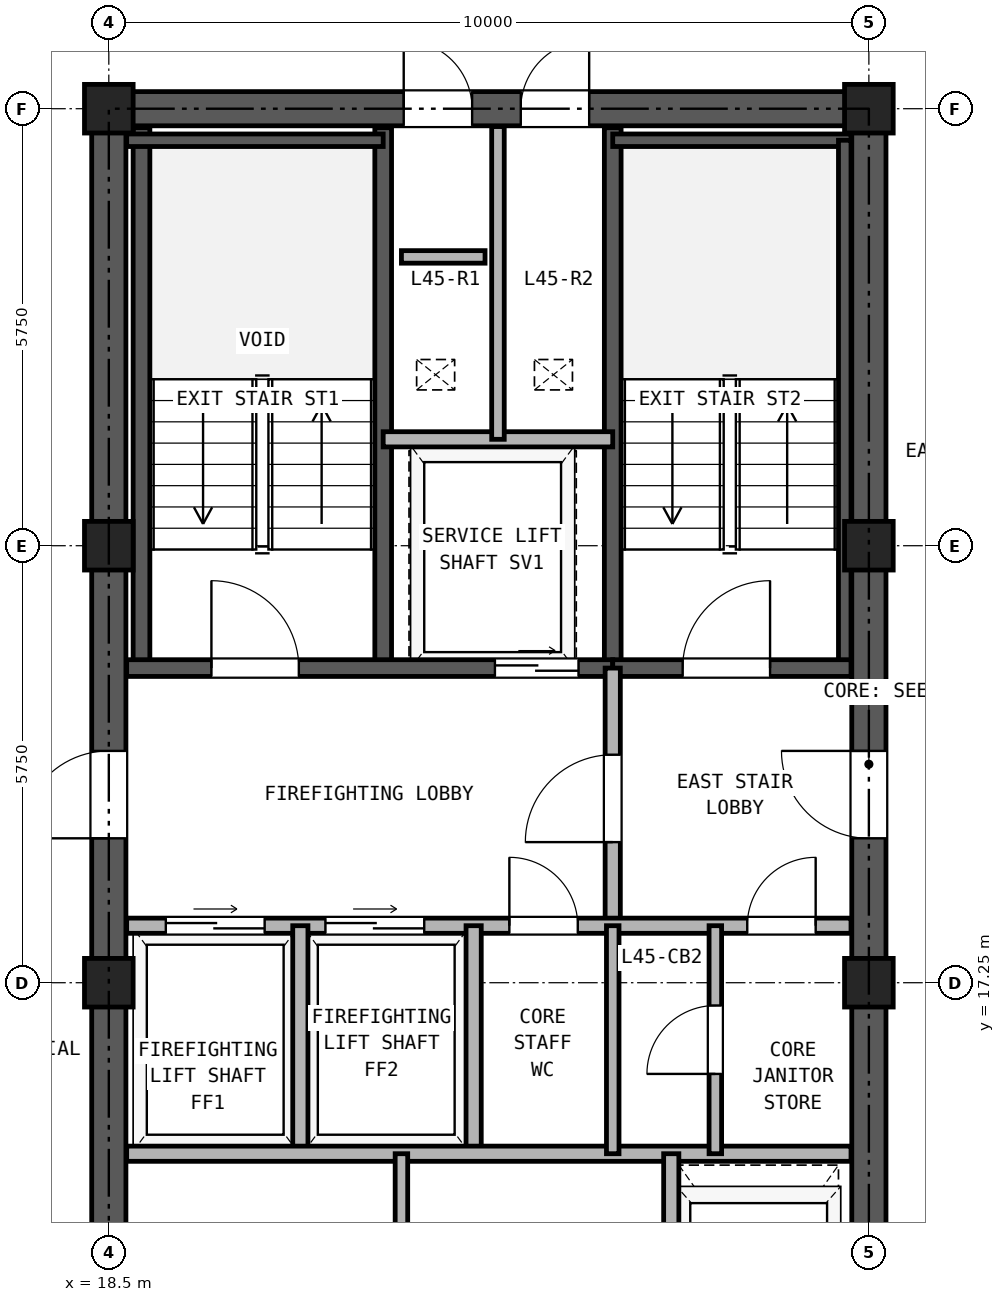
"""IFC4 building model, lengths in metres.
Left out: names, types, materials, properties, quantities, classifications, styles, units other than length and angle.
Written with IfcOpenShell. Run it as: python <this file> out.ifc"""

import sys

from ifc_helpers import new_model, si_unit, direction, frame, frame_2d, origin, origin_2d, place, context, subcontext, project, spatial, rectangle, hollow_rectangle, extrude, source, transform, mapped, element, fill, save


model = new_model("IFC4")
c1 = context("Model", 3, precision=1e-05, world=origin(), true_north=direction((0.0, 1.0)))
c2 = subcontext(c1, "Body", "Model", "MODEL_VIEW")
j1 = project(units=[si_unit("LENGTHUNIT", "METRE"), si_unit("PLANEANGLEUNIT", "RADIAN")], contexts=[c1])
p1 = place(None, origin())
s1 = spatial("IfcSite", under=j1, at=p1, CompositionType="ELEMENT")
p2 = place(p1, origin())
s2 = spatial("IfcBuilding", under=s1, at=p2, CompositionType="ELEMENT")
p3 = place(p2, frame((0.0, 0.0, 162.5)))
s3 = spatial("IfcBuildingStorey", under=s2, at=p3, CompositionType="ELEMENT", Elevation=162.5)
m1 = source(origin(), c2, "Body", "SweptSolid", [
    extrude(hollow_rectangle(XDim=0.64, YDim=0.64, WallThickness=0.035, at=origin_2d()), origin(), (0.0, 0.0, 1.0), 2.95),
])
for number, where, z_axis, x_axis in (
    (1, (18.5, 17.25, 0.0), (0.0, 0.0, 1.0), (1.0, 0.0, 0.0)),
    (2, (18.5, 23.0, 0.0), (0.0, 0.0, 1.0), (1.0, 0.0, 0.0)),
    (3, (18.5, 28.75, 0.0), (0.0, 0.0, 1.0), (1.0, 0.0, 0.0)),
    (4, (28.5, 17.25, 0.0), (0.0, 0.0, 1.0), (1.0, 0.0, 0.0)),
    (5, (28.5, 23.0, 0.0), (0.0, 0.0, 1.0), (1.0, 0.0, 0.0)),
    (6, (28.5, 28.75, 0.0), (0.0, 0.0, 1.0), (1.0, 0.0, 0.0)),
):
    element("IfcColumn", number, at=place(p3, frame(where, z_axis=z_axis, x_axis=x_axis)), inside=s3, PredefinedType="COLUMN", context=c2, shape_type="MappedRepresentation", body=[
        mapped(m1, transform((0.0, 0.0, 0.0), x_axis=(1.0, 0.0, 0.0), y_axis=(0.0, 1.0, 0.0), z_axis=(0.0, 0.0, 1.0), scale=1.0)),
    ])
p4 = place(p3, frame((18.275, 28.75, 0.0), z_axis=(0.0, 0.0, 1.0), x_axis=(1.0, 0.0, 0.0)))
e7 = element("IfcWall", 7, at=p4, inside=s3, PredefinedType="SHEAR", context=c2, shape_type="SweptSolid", body=[
    extrude(rectangle(XDim=10.45, YDim=0.45, at=frame_2d((5.225, 0.0))), origin(), (0.0, 0.0, 1.0), 2.95),
])
p5 = place(p4, frame((4.105, 0.0, 0.0)))
e8 = element("IfcOpeningElement", 8, at=p5, cuts=e7, PredefinedType="OPENING", context=c2, shape_type="SweptSolid", body=[
    extrude(rectangle(XDim=0.9, YDim=2.05, at=frame_2d((0.45, 1.025))), frame((0.0, 0.235, 0.0), z_axis=(0.0, -1.0, 0.0), x_axis=(1.0, 0.0, 0.0)), (0.0, 0.0, 1.0), 0.47),
])
p6 = place(p4, frame((5.645, 0.0, 0.0)))
e9 = element("IfcOpeningElement", 9, at=p6, cuts=e7, PredefinedType="OPENING", context=c2, shape_type="SweptSolid", body=[
    extrude(rectangle(XDim=0.9, YDim=2.05, at=frame_2d((0.45, 1.025))), frame((0.0, 0.235, 0.0), z_axis=(0.0, -1.0, 0.0), x_axis=(1.0, 0.0, 0.0)), (0.0, 0.0, 1.0), 0.47),
])
p7 = place(p3, frame((18.5, 11.725, 0.0), z_axis=(0.0, 0.0, 1.0), x_axis=(0.0, 1.0, 0.0)))
e10 = element("IfcWall", 10, at=p7, inside=s3, PredefinedType="SHEAR", context=c2, shape_type="SweptSolid", body=[
    extrude(rectangle(XDim=16.8, YDim=0.45, at=frame_2d((8.4, 0.0))), origin(), (0.0, 0.0, 1.0), 2.95),
])
p8 = place(p7, frame((7.425, 0.0, 0.0)))
e11 = element("IfcOpeningElement", 11, at=p8, cuts=e10, PredefinedType="OPENING", context=c2, shape_type="SweptSolid", body=[
    extrude(rectangle(XDim=1.15, YDim=2.2, at=frame_2d((0.575, 1.1))), frame((0.0, 0.235, 0.0), z_axis=(0.0, -1.0, 0.0), x_axis=(1.0, 0.0, 0.0)), (0.0, 0.0, 1.0), 0.47),
])
p9 = place(p3, frame((28.5, 11.725, 0.0), z_axis=(0.0, 0.0, 1.0), x_axis=(0.0, 1.0, 0.0)))
e12 = element("IfcWall", 12, at=p9, inside=s3, PredefinedType="SHEAR", context=c2, shape_type="SweptSolid", body=[
    extrude(rectangle(XDim=16.8, YDim=0.45, at=frame_2d((8.4, 0.0))), origin(), (0.0, 0.0, 1.0), 2.95),
])
p10 = place(p9, frame((7.425, 0.0, 0.0)))
e13 = element("IfcOpeningElement", 13, at=p10, cuts=e12, PredefinedType="OPENING", context=c2, shape_type="SweptSolid", body=[
    extrude(rectangle(XDim=1.15, YDim=2.2, at=frame_2d((0.575, 1.1))), frame((0.0, 0.235, 0.0), z_axis=(0.0, -1.0, 0.0), x_axis=(1.0, 0.0, 0.0)), (0.0, 0.0, 1.0), 0.47),
])
for number, where, z_axis, x_axis in (
    (14, (18.93, 21.39, 0.0), (0.0, 0.0, 1.0), (0.0, 1.0, 0.0)),
    (15, (22.11, 21.39, 0.0), (0.0, 0.0, 1.0), (0.0, 1.0, 0.0)),
    (16, (25.13, 21.39, 0.0), (0.0, 0.0, 1.0), (0.0, 1.0, 0.0)),
):
    element("IfcWall", number, at=place(p3, frame(where, z_axis=z_axis, x_axis=x_axis)), inside=s3, PredefinedType="SOLIDWALL", context=c2, shape_type="SweptSolid", body=[
        extrude(rectangle(XDim=7.11, YDim=0.22, at=frame_2d((3.555, 0.0))), origin(), (0.0, 0.0, 1.0), 2.95),
    ])
p11 = place(p3, frame((18.735, 28.335, 0.0), z_axis=(0.0, 0.0, 1.0), x_axis=(1.0, 0.0, 0.0)))
e17 = element("IfcWall", 17, at=p11, inside=s3, PredefinedType="PARTITIONING", context=c2, shape_type="SweptSolid", body=[
    extrude(rectangle(XDim=3.375, YDim=0.165, at=frame_2d((1.688, 0.0))), origin(), (0.0, 0.0, 1.0), 2.95),
])
p12 = place(p3, frame((25.13, 28.335, 0.0), z_axis=(0.0, 0.0, 1.0), x_axis=(1.0, 0.0, 0.0)))
e18 = element("IfcWall", 18, at=p12, inside=s3, PredefinedType="PARTITIONING", context=c2, shape_type="SweptSolid", body=[
    extrude(rectangle(XDim=3.135, YDim=0.165, at=frame_2d((1.567, 0.0))), origin(), (0.0, 0.0, 1.0), 2.95),
])
p13 = place(p3, frame((28.183, 21.39, 0.0), z_axis=(0.0, 0.0, 1.0), x_axis=(0.0, 1.0, 0.0)))
e19 = element("IfcWall", 19, at=p13, inside=s3, PredefinedType="PARTITIONING", context=c2, shape_type="SweptSolid", body=[
    extrude(rectangle(XDim=6.945, YDim=0.165, at=frame_2d((3.473, 0.0))), origin(), (0.0, 0.0, 1.0), 2.95),
])
p14 = place(p3, frame((18.735, 21.39, 0.0), z_axis=(0.0, 0.0, 1.0), x_axis=(1.0, 0.0, 0.0)))
e20 = element("IfcWall", 20, at=p14, inside=s3, PredefinedType="SOLIDWALL", context=c2, shape_type="SweptSolid", body=[
    extrude(rectangle(XDim=6.395, YDim=0.22, at=frame_2d((3.197, 0.0))), origin(), (0.0, 0.0, 1.0), 2.95),
])
p15 = place(p14, frame((1.115, 0.0, 0.0)))
e21 = element("IfcOpeningElement", 21, at=p15, cuts=e20, PredefinedType="OPENING", context=c2, shape_type="SweptSolid", body=[
    extrude(rectangle(XDim=1.15, YDim=2.2, at=frame_2d((0.575, 1.1))), frame((0.0, 0.12, 0.0), z_axis=(0.0, -1.0, 0.0), x_axis=(1.0, 0.0, 0.0)), (0.0, 0.0, 1.0), 0.24),
])
p16 = place(p14, frame((4.845, 0.0, 0.0)))
e22 = element("IfcOpeningElement", 22, at=p16, cuts=e20, PredefinedType="OPENING", context=c2, shape_type="SweptSolid", body=[
    extrude(rectangle(XDim=1.1, YDim=2.25, at=frame_2d((0.55, 1.125))), frame((0.0, 0.12, 0.0), z_axis=(0.0, -1.0, 0.0), x_axis=(1.0, 0.0, 0.0)), (0.0, 0.0, 1.0), 0.24),
])
p17 = place(p3, frame((25.13, 21.39, 0.0), z_axis=(0.0, 0.0, 1.0), x_axis=(1.0, 0.0, 0.0)))
e23 = element("IfcWall", 23, at=p17, inside=s3, PredefinedType="SOLIDWALL", context=c2, shape_type="SweptSolid", body=[
    extrude(rectangle(XDim=3.135, YDim=0.22, at=frame_2d((1.567, 0.0))), origin(), (0.0, 0.0, 1.0), 2.95),
])
p18 = place(p17, frame((0.92, 0.0, 0.0)))
e24 = element("IfcOpeningElement", 24, at=p18, cuts=e23, PredefinedType="OPENING", context=c2, shape_type="SweptSolid", body=[
    extrude(rectangle(XDim=1.15, YDim=2.2, at=frame_2d((0.575, 1.1))), frame((0.0, 0.12, 0.0), z_axis=(0.0, -1.0, 0.0), x_axis=(1.0, 0.0, 0.0)), (0.0, 0.0, 1.0), 0.24),
])
p19 = place(p3, frame((22.11, 24.4, 0.0), z_axis=(0.0, 0.0, 1.0), x_axis=(1.0, 0.0, 0.0)))
e25 = element("IfcWall", 25, at=p19, inside=s3, PredefinedType="PARTITIONING", context=c2, shape_type="SweptSolid", body=[
    extrude(rectangle(XDim=3.02, YDim=0.2, at=frame_2d((1.51, 0.0))), origin(), (0.0, 0.0, 1.0), 2.95),
])
p20 = place(p3, frame((23.62, 24.4, 0.0), z_axis=(0.0, 0.0, 1.0), x_axis=(0.0, 1.0, 0.0)))
e26 = element("IfcWall", 26, at=p20, inside=s3, PredefinedType="PARTITIONING", context=c2, shape_type="SweptSolid", body=[
    extrude(rectangle(XDim=4.115, YDim=0.165, at=frame_2d((2.058, 0.0))), origin(), (0.0, 0.0, 1.0), 2.95),
])
p21 = place(p3, frame((25.13, 18.0, 0.0), z_axis=(0.0, 0.0, 1.0), x_axis=(0.0, 1.0, 0.0)))
e27 = element("IfcWall", 27, at=p21, inside=s3, PredefinedType="PARTITIONING", context=c2, shape_type="SweptSolid", body=[
    extrude(rectangle(XDim=3.39, YDim=0.2, at=frame_2d((1.695, 0.0))), origin(), (0.0, 0.0, 1.0), 2.95),
])
p22 = place(p21, frame((1.1, 0.0, 0.0)))
e28 = element("IfcOpeningElement", 28, at=p22, cuts=e27, PredefinedType="OPENING", context=c2, shape_type="SweptSolid", body=[
    extrude(rectangle(XDim=1.15, YDim=2.2, at=frame_2d((0.575, 1.1))), frame((0.0, 0.11, 0.0), z_axis=(0.0, -1.0, 0.0), x_axis=(1.0, 0.0, 0.0)), (0.0, 0.0, 1.0), 0.22),
])
p23 = place(p3, frame((18.735, 18.0, 0.0), z_axis=(0.0, 0.0, 1.0), x_axis=(1.0, 0.0, 0.0)))
e29 = element("IfcWall", 29, at=p23, inside=s3, PredefinedType="PARTITIONING", context=c2, shape_type="SweptSolid", body=[
    extrude(rectangle(XDim=9.53, YDim=0.2, at=frame_2d((4.765, 0.0))), origin(), (0.0, 0.0, 1.0), 2.95),
])
p24 = place(p23, frame((0.515, 0.0, 0.0)))
e30 = element("IfcOpeningElement", 30, at=p24, cuts=e29, PredefinedType="OPENING", context=c2, shape_type="SweptSolid", body=[
    extrude(rectangle(XDim=1.3, YDim=2.3, at=frame_2d((0.65, 1.15))), frame((0.0, 0.11, 0.0), z_axis=(0.0, -1.0, 0.0), x_axis=(1.0, 0.0, 0.0)), (0.0, 0.0, 1.0), 0.22),
])
p25 = place(p23, frame((2.615, 0.0, 0.0)))
e31 = element("IfcOpeningElement", 31, at=p25, cuts=e29, PredefinedType="OPENING", context=c2, shape_type="SweptSolid", body=[
    extrude(rectangle(XDim=1.3, YDim=2.3, at=frame_2d((0.65, 1.15))), frame((0.0, 0.11, 0.0), z_axis=(0.0, -1.0, 0.0), x_axis=(1.0, 0.0, 0.0)), (0.0, 0.0, 1.0), 0.22),
])
p26 = place(p23, frame((5.035, 0.0, 0.0)))
e32 = element("IfcOpeningElement", 32, at=p26, cuts=e29, PredefinedType="OPENING", context=c2, shape_type="SweptSolid", body=[
    extrude(rectangle(XDim=0.9, YDim=2.05, at=frame_2d((0.45, 1.025))), frame((0.0, 0.11, 0.0), z_axis=(0.0, -1.0, 0.0), x_axis=(1.0, 0.0, 0.0)), (0.0, 0.0, 1.0), 0.22),
])
p27 = place(p23, frame((8.165, 0.0, 0.0)))
e33 = element("IfcOpeningElement", 33, at=p27, cuts=e29, PredefinedType="OPENING", context=c2, shape_type="SweptSolid", body=[
    extrude(rectangle(XDim=0.9, YDim=2.05, at=frame_2d((0.45, 1.025))), frame((0.0, 0.11, 0.0), z_axis=(0.0, -1.0, 0.0), x_axis=(1.0, 0.0, 0.0)), (0.0, 0.0, 1.0), 0.22),
])
for number, where, z_axis, x_axis in (
    (34, (21.02, 15.0, 0.0), (0.0, 0.0, 1.0), (0.0, 1.0, 0.0)),
    (35, (23.3, 15.0, 0.0), (0.0, 0.0, 1.0), (0.0, 1.0, 0.0)),
):
    element("IfcWall", number, at=place(p3, frame(where, z_axis=z_axis, x_axis=x_axis)), inside=s3, PredefinedType="PARTITIONING", context=c2, shape_type="SweptSolid", body=[
        extrude(rectangle(XDim=3.0, YDim=0.2, at=frame_2d((1.5, 0.0))), origin(), (0.0, 0.0, 1.0), 2.95),
    ])
p28 = place(p3, frame((18.735, 15.0, 0.0), z_axis=(0.0, 0.0, 1.0), x_axis=(1.0, 0.0, 0.0)))
e36 = element("IfcWall", 36, at=p28, inside=s3, PredefinedType="PARTITIONING", context=c2, shape_type="SweptSolid", body=[
    extrude(rectangle(XDim=9.53, YDim=0.2, at=frame_2d((4.765, 0.0))), origin(), (0.0, 0.0, 1.0), 2.95),
])
p29 = place(p3, frame((25.13, 15.0, 0.0), z_axis=(0.0, 0.0, 1.0), x_axis=(0.0, 1.0, 0.0)))
e37 = element("IfcWall", 37, at=p29, inside=s3, PredefinedType="PARTITIONING", context=c2, shape_type="SweptSolid", body=[
    extrude(rectangle(XDim=3.0, YDim=0.165, at=frame_2d((1.5, 0.0))), origin(), (0.0, 0.0, 1.0), 2.95),
])
p30 = place(p3, frame((26.48, 15.0, 0.0), z_axis=(0.0, 0.0, 1.0), x_axis=(0.0, 1.0, 0.0)))
e38 = element("IfcWall", 38, at=p30, inside=s3, PredefinedType="PARTITIONING", context=c2, shape_type="SweptSolid", body=[
    extrude(rectangle(XDim=3.0, YDim=0.165, at=frame_2d((1.5, 0.0))), origin(), (0.0, 0.0, 1.0), 2.95),
])
p31 = place(p30, frame((1.05, 0.0, 0.0)))
e39 = element("IfcOpeningElement", 39, at=p31, cuts=e38, PredefinedType="OPENING", context=c2, shape_type="SweptSolid", body=[
    extrude(rectangle(XDim=0.9, YDim=2.05, at=frame_2d((0.45, 1.025))), frame((0.0, 0.093, 0.0), z_axis=(0.0, -1.0, 0.0), x_axis=(1.0, 0.0, 0.0)), (0.0, 0.0, 1.0), 0.185),
])
p32 = place(p3, frame((22.35, 11.735, 0.0), z_axis=(0.0, 0.0, 1.0), x_axis=(0.0, 1.0, 0.0)))
e40 = element("IfcWall", 40, at=p32, inside=s3, PredefinedType="PARTITIONING", context=c2, shape_type="SweptSolid", body=[
    extrude(rectangle(XDim=3.265, YDim=0.165, at=frame_2d((1.632, 0.0))), origin(), (0.0, 0.0, 1.0), 2.95),
])
p33 = place(p3, frame((25.9, 11.735, 0.0), z_axis=(0.0, 0.0, 1.0), x_axis=(0.0, 1.0, 0.0)))
e41 = element("IfcWall", 41, at=p33, inside=s3, PredefinedType="PARTITIONING", context=c2, shape_type="SweptSolid", body=[
    extrude(rectangle(XDim=3.265, YDim=0.2, at=frame_2d((1.632, 0.0))), origin(), (0.0, 0.0, 1.0), 2.95),
])
p34 = place(p3, frame((22.35, 26.8, 0.0), z_axis=(0.0, 0.0, 1.0), x_axis=(1.0, 0.0, 0.0)))
e42 = element("IfcWall", 42, at=p34, inside=s3, PredefinedType="PARTITIONING", context=c2, shape_type="SweptSolid", body=[
    extrude(rectangle(XDim=1.1, YDim=0.165, at=frame_2d((0.55, 0.0))), origin(), (0.0, 0.0, 1.0), 2.95),
])
p35 = place(p15, frame((1.15, 0.0, 0.0), z_axis=(0.0, 0.0, 1.0), x_axis=(-1.0, 0.0, 0.0)))
e43 = element("IfcDoor", 43, at=p35, inside=s3, OperationType="SINGLE_SWING_LEFT", PredefinedType="DOOR", context=c2, shape_type="SweptSolid", body=[
    extrude(rectangle(XDim=1.15, YDim=2.2, at=frame_2d((0.575, 1.1))), frame((0.0, 0.025, 0.0), z_axis=(0.0, -1.0, 0.0), x_axis=(1.0, 0.0, 0.0)), (0.0, 0.0, 1.0), 0.05),
])
fill(e21, e43)
p36 = place(p18, frame((1.15, 0.0, 0.0), z_axis=(0.0, 0.0, 1.0), x_axis=(-1.0, 0.0, 0.0)))
e44 = element("IfcDoor", 44, at=p36, inside=s3, OperationType="SINGLE_SWING_RIGHT", PredefinedType="DOOR", context=c2, shape_type="SweptSolid", body=[
    extrude(rectangle(XDim=1.15, YDim=2.2, at=frame_2d((0.575, 1.1))), frame((0.0, 0.025, 0.0), z_axis=(0.0, -1.0, 0.0), x_axis=(1.0, 0.0, 0.0)), (0.0, 0.0, 1.0), 0.05),
])
fill(e24, e44)
p37 = place(p16, frame((1.1, 0.0, 0.0), z_axis=(0.0, 0.0, 1.0), x_axis=(-1.0, 0.0, 0.0)))
e45 = element("IfcDoor", 45, at=p37, inside=s3, OperationType="DOUBLE_DOOR_SLIDING", PredefinedType="DOOR", context=c2, shape_type="SweptSolid", body=[
    extrude(rectangle(XDim=1.1, YDim=2.25, at=frame_2d((0.55, 1.125))), frame((0.0, 0.025, 0.0), z_axis=(0.0, -1.0, 0.0), x_axis=(1.0, 0.0, 0.0)), (0.0, 0.0, 1.0), 0.05),
])
fill(e22, e45)
p38 = place(p22, origin())
e46 = element("IfcDoor", 46, at=p38, inside=s3, OperationType="SINGLE_SWING_LEFT", PredefinedType="DOOR", context=c2, shape_type="SweptSolid", body=[
    extrude(rectangle(XDim=1.15, YDim=2.2, at=frame_2d((0.575, 1.1))), frame((0.0, 0.025, 0.0), z_axis=(0.0, -1.0, 0.0), x_axis=(1.0, 0.0, 0.0)), (0.0, 0.0, 1.0), 0.05),
])
fill(e28, e46)
p39 = place(p24, origin())
e47 = element("IfcDoor", 47, at=p39, inside=s3, OperationType="DOUBLE_DOOR_SLIDING", PredefinedType="DOOR", context=c2, shape_type="SweptSolid", body=[
    extrude(rectangle(XDim=1.3, YDim=2.3, at=frame_2d((0.65, 1.15))), frame((0.0, 0.025, 0.0), z_axis=(0.0, -1.0, 0.0), x_axis=(1.0, 0.0, 0.0)), (0.0, 0.0, 1.0), 0.05),
])
fill(e30, e47)
p40 = place(p25, origin())
e48 = element("IfcDoor", 48, at=p40, inside=s3, OperationType="DOUBLE_DOOR_SLIDING", PredefinedType="DOOR", context=c2, shape_type="SweptSolid", body=[
    extrude(rectangle(XDim=1.3, YDim=2.3, at=frame_2d((0.65, 1.15))), frame((0.0, 0.025, 0.0), z_axis=(0.0, -1.0, 0.0), x_axis=(1.0, 0.0, 0.0)), (0.0, 0.0, 1.0), 0.05),
])
fill(e31, e48)
p41 = place(p26, frame((0.9, 0.0, 0.0), z_axis=(0.0, 0.0, 1.0), x_axis=(-1.0, 0.0, 0.0)))
e49 = element("IfcDoor", 49, at=p41, inside=s3, OperationType="SINGLE_SWING_LEFT", PredefinedType="DOOR", context=c2, shape_type="SweptSolid", body=[
    extrude(rectangle(XDim=0.9, YDim=2.05, at=frame_2d((0.45, 1.025))), frame((0.0, 0.025, 0.0), z_axis=(0.0, -1.0, 0.0), x_axis=(1.0, 0.0, 0.0)), (0.0, 0.0, 1.0), 0.05),
])
fill(e32, e49)
p42 = place(p31, origin())
e50 = element("IfcDoor", 50, at=p42, inside=s3, OperationType="SINGLE_SWING_LEFT", PredefinedType="DOOR", context=c2, shape_type="SweptSolid", body=[
    extrude(rectangle(XDim=0.9, YDim=2.05, at=frame_2d((0.45, 1.025))), frame((0.0, 0.025, 0.0), z_axis=(0.0, -1.0, 0.0), x_axis=(1.0, 0.0, 0.0)), (0.0, 0.0, 1.0), 0.05),
])
fill(e39, e50)
p43 = place(p27, frame((0.9, 0.0, 0.0), z_axis=(0.0, 0.0, 1.0), x_axis=(-1.0, 0.0, 0.0)))
e51 = element("IfcDoor", 51, at=p43, inside=s3, OperationType="SINGLE_SWING_RIGHT", PredefinedType="DOOR", context=c2, shape_type="SweptSolid", body=[
    extrude(rectangle(XDim=0.9, YDim=2.05, at=frame_2d((0.45, 1.025))), frame((0.0, 0.025, 0.0), z_axis=(0.0, -1.0, 0.0), x_axis=(1.0, 0.0, 0.0)), (0.0, 0.0, 1.0), 0.05),
])
fill(e33, e51)
p44 = place(p8, frame((1.15, 0.0, 0.0), z_axis=(0.0, 0.0, 1.0), x_axis=(-1.0, 0.0, 0.0)))
e52 = element("IfcDoor", 52, at=p44, inside=s3, OperationType="SINGLE_SWING_LEFT", PredefinedType="DOOR", context=c2, shape_type="SweptSolid", body=[
    extrude(rectangle(XDim=1.15, YDim=2.2, at=frame_2d((0.575, 1.1))), frame((0.0, 0.025, 0.0), z_axis=(0.0, -1.0, 0.0), x_axis=(1.0, 0.0, 0.0)), (0.0, 0.0, 1.0), 0.05),
])
fill(e11, e52)
p45 = place(p10, origin())
e53 = element("IfcDoor", 53, at=p45, inside=s3, OperationType="SINGLE_SWING_RIGHT", PredefinedType="DOOR", context=c2, shape_type="SweptSolid", body=[
    extrude(rectangle(XDim=1.15, YDim=2.2, at=frame_2d((0.575, 1.1))), frame((0.0, 0.025, 0.0), z_axis=(0.0, -1.0, 0.0), x_axis=(1.0, 0.0, 0.0)), (0.0, 0.0, 1.0), 0.05),
])
fill(e13, e53)
p46 = place(p5, origin())
e54 = element("IfcDoor", 54, at=p46, inside=s3, OperationType="SINGLE_SWING_LEFT", PredefinedType="DOOR", context=c2, shape_type="SweptSolid", body=[
    extrude(rectangle(XDim=0.9, YDim=2.05, at=frame_2d((0.45, 1.025))), frame((0.0, 0.025, 0.0), z_axis=(0.0, -1.0, 0.0), x_axis=(1.0, 0.0, 0.0)), (0.0, 0.0, 1.0), 0.05),
])
fill(e8, e54)
p47 = place(p6, origin())
e55 = element("IfcDoor", 55, at=p47, inside=s3, OperationType="SINGLE_SWING_RIGHT", PredefinedType="DOOR", context=c2, shape_type="SweptSolid", body=[
    extrude(rectangle(XDim=0.9, YDim=2.05, at=frame_2d((0.45, 1.025))), frame((0.0, 0.025, 0.0), z_axis=(0.0, -1.0, 0.0), x_axis=(1.0, 0.0, 0.0)), (0.0, 0.0, 1.0), 0.05),
])
fill(e9, e55)
save(model, sys.argv[1])
